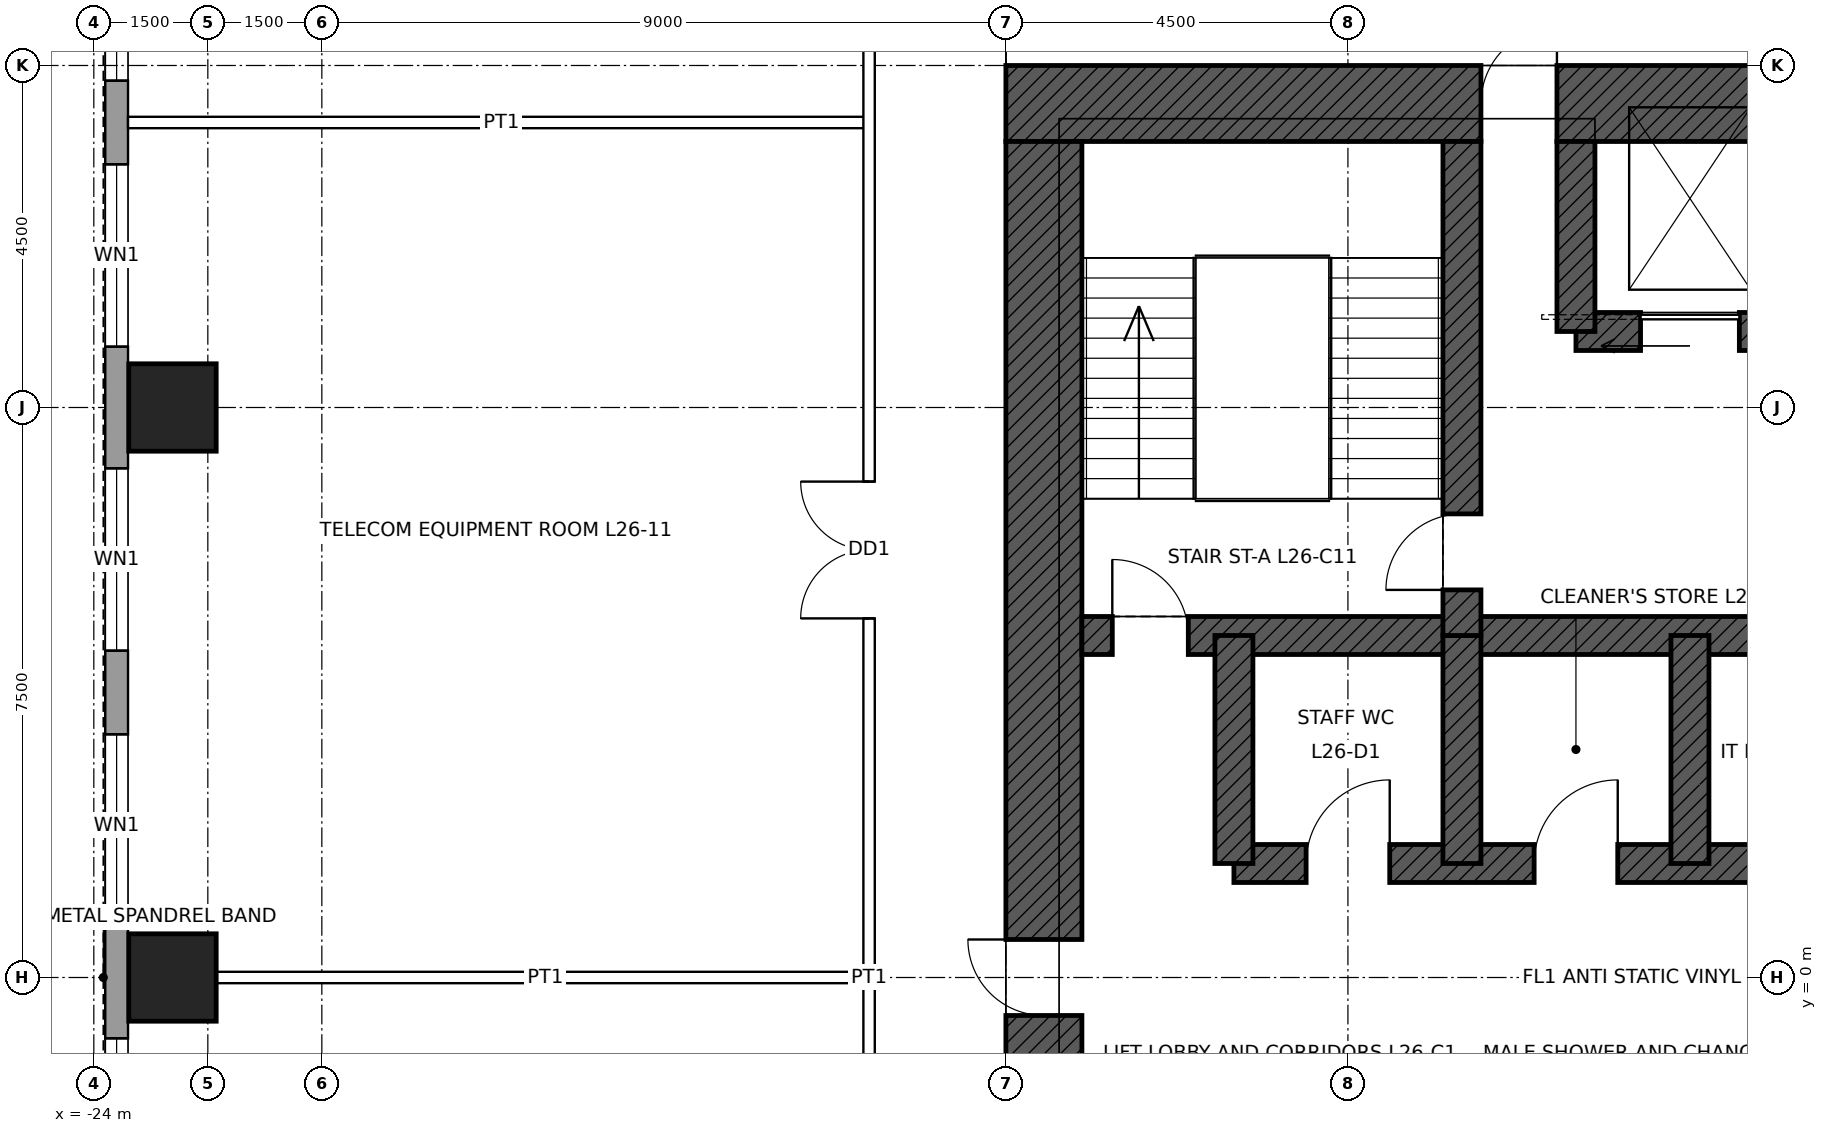
"""IFC4 building model, lengths in metres.
Left out: names, types, materials, properties, quantities, classifications, styles, units other than length and angle.
Written with IfcOpenShell. Run it as: python <this file> out.ifc"""

import sys

from ifc_helpers import new_model, si_unit, direction, frame, frame_2d, origin, origin_2d, place, context, subcontext, project, spatial, rectangle, hollow_rectangle, extrude, element, fill, save


model = new_model("IFC4")
c1 = context("Model", 3, precision=1e-05, world=origin(), true_north=direction((0.0, 1.0)))
c2 = subcontext(c1, "Body", "Model", "MODEL_VIEW")
j1 = project(units=[si_unit("LENGTHUNIT", "METRE"), si_unit("PLANEANGLEUNIT", "RADIAN")], contexts=[c1])
p1 = place(None, origin())
s1 = spatial("IfcSite", under=j1, at=p1, CompositionType="ELEMENT")
p2 = place(p1, origin())
s2 = spatial("IfcBuilding", under=s1, at=p2, CompositionType="ELEMENT")
p3 = place(p2, frame((0.0, 0.0, 131.4)))
s3 = spatial("IfcBuildingStorey", under=s2, at=p3, CompositionType="ELEMENT", Elevation=131.4)
for number, where, z_axis, x_axis in (
    (1, (-22.965, 0.0, 0.0), (0.0, 0.0, 1.0), (1.0, 0.0, 0.0)),
    (2, (-22.965, 7.5, 0.0), (0.0, 0.0, 1.0), (1.0, 0.0, 0.0)),
):
    element("IfcColumn", number, at=place(p3, frame(where, z_axis=z_axis, x_axis=x_axis)), inside=s3, PredefinedType="COLUMN", context=c2, shape_type="SweptSolid", body=[
        extrude(hollow_rectangle(XDim=1.15, YDim=1.15, WallThickness=0.075, at=origin_2d()), origin(), (0.0, 0.0, 1.0), 4.5),
    ])
p4 = place(p3, frame((-12.0, 11.5, 0.0), z_axis=(0.0, 0.0, 1.0), x_axis=(1.0, 0.0, 0.0)))
e3 = element("IfcWall", 3, at=p4, inside=s3, PredefinedType="SHEAR", context=c2, shape_type="SweptSolid", body=[
    extrude(rectangle(XDim=24.0, YDim=1.0, at=frame_2d((12.0, 0.0))), origin(), (0.0, 0.0, 1.0), 4.5),
])
p5 = place(p4, frame((6.25, 0.0, 0.0)))
e4 = element("IfcOpeningElement", 4, at=p5, cuts=e3, PredefinedType="OPENING", context=c2, shape_type="SweptSolid", body=[
    extrude(rectangle(XDim=1.0, YDim=2.4, at=frame_2d((0.5, 1.2))), frame((0.0, 0.51, 0.0), z_axis=(0.0, -1.0, 0.0), x_axis=(1.0, 0.0, 0.0)), (0.0, 0.0, 1.0), 1.02),
])
p6 = place(p4, frame((16.75, 0.0, 0.0)))
e5 = element("IfcOpeningElement", 5, at=p6, cuts=e3, PredefinedType="OPENING", context=c2, shape_type="SweptSolid", body=[
    extrude(rectangle(XDim=1.0, YDim=2.4, at=frame_2d((0.5, 1.2))), frame((0.0, 0.51, 0.0), z_axis=(0.0, -1.0, 0.0), x_axis=(1.0, 0.0, 0.0)), (0.0, 0.0, 1.0), 1.02),
])
p7 = place(p3, frame((-11.5, -11.0, 0.0), z_axis=(0.0, 0.0, 1.0), x_axis=(0.0, 1.0, 0.0)))
e6 = element("IfcWall", 6, at=p7, inside=s3, PredefinedType="SHEAR", context=c2, shape_type="SweptSolid", body=[
    extrude(rectangle(XDim=22.0, YDim=1.0, at=frame_2d((11.0, 0.0))), origin(), (0.0, 0.0, 1.0), 4.5),
])
p8 = place(p7, frame((10.5, 0.0, 0.0)))
e7 = element("IfcOpeningElement", 7, at=p8, cuts=e6, PredefinedType="OPENING", context=c2, shape_type="SweptSolid", body=[
    extrude(rectangle(XDim=1.0, YDim=2.4, at=frame_2d((0.5, 1.2))), frame((0.0, 0.51, 0.0), z_axis=(0.0, -1.0, 0.0), x_axis=(1.0, 0.0, 0.0)), (0.0, 0.0, 1.0), 1.02),
])
p9 = place(p3, frame((-11.0, 4.5, 0.0), z_axis=(0.0, 0.0, 1.0), x_axis=(1.0, 0.0, 0.0)))
e8 = element("IfcWall", 8, at=p9, inside=s3, PredefinedType="SHEAR", context=c2, shape_type="SweptSolid", body=[
    extrude(rectangle(XDim=22.0, YDim=0.5, at=frame_2d((11.0, 0.0))), origin(), (0.0, 0.0, 1.0), 4.5),
])
p10 = place(p9, frame((0.4, 0.0, 0.0)))
e9 = element("IfcOpeningElement", 9, at=p10, cuts=e8, PredefinedType="OPENING", context=c2, shape_type="SweptSolid", body=[
    extrude(rectangle(XDim=1.0, YDim=2.1, at=frame_2d((0.5, 1.05))), frame((0.0, 0.26, 0.0), z_axis=(0.0, -1.0, 0.0), x_axis=(1.0, 0.0, 0.0)), (0.0, 0.0, 1.0), 0.52),
])
p11 = place(p9, frame((20.6, 0.0, 0.0)))
e10 = element("IfcOpeningElement", 10, at=p11, cuts=e8, PredefinedType="OPENING", context=c2, shape_type="SweptSolid", body=[
    extrude(rectangle(XDim=1.0, YDim=2.1, at=frame_2d((0.5, 1.05))), frame((0.0, 0.26, 0.0), z_axis=(0.0, -1.0, 0.0), x_axis=(1.0, 0.0, 0.0)), (0.0, 0.0, 1.0), 0.52),
])
p12 = place(p3, frame((-9.0, 1.5, 0.0), z_axis=(0.0, 0.0, 1.0), x_axis=(1.0, 0.0, 0.0)))
e11 = element("IfcWall", 11, at=p12, inside=s3, PredefinedType="SHEAR", context=c2, shape_type="SweptSolid", body=[
    extrude(rectangle(XDim=18.0, YDim=0.5, at=frame_2d((9.0, 0.0))), origin(), (0.0, 0.0, 1.0), 4.5),
])
p13 = place(p12, frame((9.95, 0.0, 0.0)))
e12 = element("IfcOpeningElement", 12, at=p13, cuts=e11, PredefinedType="OPENING", context=c2, shape_type="SweptSolid", body=[
    extrude(rectangle(XDim=1.1, YDim=2.1, at=frame_2d((0.55, 1.05))), frame((0.0, 0.26, 0.0), z_axis=(0.0, -1.0, 0.0), x_axis=(1.0, 0.0, 0.0)), (0.0, 0.0, 1.0), 0.52),
])
p14 = place(p12, frame((12.95, 0.0, 0.0)))
e13 = element("IfcOpeningElement", 13, at=p14, cuts=e11, PredefinedType="OPENING", context=c2, shape_type="SweptSolid", body=[
    extrude(rectangle(XDim=1.1, YDim=2.1, at=frame_2d((0.55, 1.05))), frame((0.0, 0.26, 0.0), z_axis=(0.0, -1.0, 0.0), x_axis=(1.0, 0.0, 0.0)), (0.0, 0.0, 1.0), 0.52),
])
p15 = place(p12, frame((15.95, 0.0, 0.0)))
e14 = element("IfcOpeningElement", 14, at=p15, cuts=e11, PredefinedType="OPENING", context=c2, shape_type="SweptSolid", body=[
    extrude(rectangle(XDim=1.1, YDim=2.1, at=frame_2d((0.55, 1.05))), frame((0.0, 0.26, 0.0), z_axis=(0.0, -1.0, 0.0), x_axis=(1.0, 0.0, 0.0)), (0.0, 0.0, 1.0), 0.52),
])
p16 = place(p12, frame((0.95, 0.0, 0.0)))
e15 = element("IfcOpeningElement", 15, at=p16, cuts=e11, PredefinedType="OPENING", context=c2, shape_type="SweptSolid", body=[
    extrude(rectangle(XDim=1.1, YDim=2.1, at=frame_2d((0.55, 1.05))), frame((0.0, 0.26, 0.0), z_axis=(0.0, -1.0, 0.0), x_axis=(1.0, 0.0, 0.0)), (0.0, 0.0, 1.0), 0.52),
])
p17 = place(p12, frame((3.95, 0.0, 0.0)))
e16 = element("IfcOpeningElement", 16, at=p17, cuts=e11, PredefinedType="OPENING", context=c2, shape_type="SweptSolid", body=[
    extrude(rectangle(XDim=1.1, YDim=2.1, at=frame_2d((0.55, 1.05))), frame((0.0, 0.26, 0.0), z_axis=(0.0, -1.0, 0.0), x_axis=(1.0, 0.0, 0.0)), (0.0, 0.0, 1.0), 0.52),
])
p18 = place(p12, frame((6.95, 0.0, 0.0)))
e17 = element("IfcOpeningElement", 17, at=p18, cuts=e11, PredefinedType="OPENING", context=c2, shape_type="SweptSolid", body=[
    extrude(rectangle(XDim=1.1, YDim=2.1, at=frame_2d((0.55, 1.05))), frame((0.0, 0.26, 0.0), z_axis=(0.0, -1.0, 0.0), x_axis=(1.0, 0.0, 0.0)), (0.0, 0.0, 1.0), 0.52),
])
p19 = place(p3, frame((-4.5, 8.5, 0.0), z_axis=(0.0, 0.0, 1.0), x_axis=(1.0, 0.0, 0.0)))
e18 = element("IfcWall", 18, at=p19, inside=s3, PredefinedType="SHEAR", context=c2, shape_type="SweptSolid", body=[
    extrude(rectangle(XDim=9.0, YDim=0.5, at=frame_2d((4.5, 0.0))), origin(), (0.0, 0.0, 1.0), 4.5),
])
p20 = place(p19, frame((0.85, 0.0, 0.0)))
e19 = element("IfcOpeningElement", 19, at=p20, cuts=e18, PredefinedType="OPENING", context=c2, shape_type="SweptSolid", body=[
    extrude(rectangle(XDim=1.3, YDim=2.4, at=frame_2d((0.65, 1.2))), frame((0.0, 0.26, 0.0), z_axis=(0.0, -1.0, 0.0), x_axis=(1.0, 0.0, 0.0)), (0.0, 0.0, 1.0), 0.52),
])
p21 = place(p19, frame((6.85, 0.0, 0.0)))
e20 = element("IfcOpeningElement", 20, at=p21, cuts=e18, PredefinedType="OPENING", context=c2, shape_type="SweptSolid", body=[
    extrude(rectangle(XDim=1.3, YDim=2.4, at=frame_2d((0.65, 1.2))), frame((0.0, 0.26, 0.0), z_axis=(0.0, -1.0, 0.0), x_axis=(1.0, 0.0, 0.0)), (0.0, 0.0, 1.0), 0.52),
])
p22 = place(p19, frame((3.85, 0.0, 0.0)))
e21 = element("IfcOpeningElement", 21, at=p22, cuts=e18, PredefinedType="OPENING", context=c2, shape_type="SweptSolid", body=[
    extrude(rectangle(XDim=1.3, YDim=2.4, at=frame_2d((0.65, 1.2))), frame((0.0, 0.26, 0.0), z_axis=(0.0, -1.0, 0.0), x_axis=(1.0, 0.0, 0.0)), (0.0, 0.0, 1.0), 0.52),
])
for number, where, z_axis, x_axis in (
    (22, (-9.0, 1.5, 0.0), (0.0, 0.0, 1.0), (0.0, 1.0, 0.0)),
    (23, (-6.0, 1.5, 0.0), (0.0, 0.0, 1.0), (0.0, 1.0, 0.0)),
    (24, (-3.0, 1.5, 0.0), (0.0, 0.0, 1.0), (0.0, 1.0, 0.0)),
):
    element("IfcWall", number, at=place(p3, frame(where, z_axis=z_axis, x_axis=x_axis)), inside=s3, PredefinedType="SHEAR", context=c2, shape_type="SweptSolid", body=[
        extrude(rectangle(XDim=3.0, YDim=0.5, at=frame_2d((1.5, 0.0))), origin(), (0.0, 0.0, 1.0), 4.5),
    ])
p23 = place(p3, frame((-6.0, 4.5, 0.0), z_axis=(0.0, 0.0, 1.0), x_axis=(0.0, 1.0, 0.0)))
e25 = element("IfcWall", 25, at=p23, inside=s3, PredefinedType="SHEAR", context=c2, shape_type="SweptSolid", body=[
    extrude(rectangle(XDim=6.5, YDim=0.5, at=frame_2d((3.25, 0.0))), origin(), (0.0, 0.0, 1.0), 4.5),
])
p24 = place(p23, frame((0.6, 0.0, 0.0)))
e26 = element("IfcOpeningElement", 26, at=p24, cuts=e25, PredefinedType="OPENING", context=c2, shape_type="SweptSolid", body=[
    extrude(rectangle(XDim=1.0, YDim=2.1, at=frame_2d((0.5, 1.05))), frame((0.0, 0.26, 0.0), z_axis=(0.0, -1.0, 0.0), x_axis=(1.0, 0.0, 0.0)), (0.0, 0.0, 1.0), 0.52),
])
p25 = place(p3, frame((-4.5, 8.5, 0.0), z_axis=(0.0, 0.0, 1.0), x_axis=(0.0, 1.0, 0.0)))
e27 = element("IfcWall", 27, at=p25, inside=s3, PredefinedType="SHEAR", context=c2, shape_type="SweptSolid", body=[
    extrude(rectangle(XDim=2.5, YDim=0.5, at=frame_2d((1.25, 0.0))), origin(), (0.0, 0.0, 1.0), 4.5),
])
p26 = place(p3, frame((-23.7, -16.2, 0.0), z_axis=(0.0, 0.0, 1.0), x_axis=(0.0, 1.0, 0.0)))
e28 = element("IfcWall", 28, at=p26, inside=s3, PredefinedType="SOLIDWALL", context=c2, shape_type="SweptSolid", body=[
    extrude(rectangle(XDim=32.4, YDim=0.3, at=frame_2d((16.2, 0.0))), origin(), (0.0, 0.0, 1.0), 4.3),
])
p27 = place(p26, frame((2.0, 0.0, 1.0)))
e29 = element("IfcOpeningElement", 29, at=p27, cuts=e28, PredefinedType="OPENING", context=c2, shape_type="SweptSolid", body=[
    extrude(rectangle(XDim=2.4, YDim=1.2, at=frame_2d((1.2, 0.6))), frame((0.0, 0.16, 0.0), z_axis=(0.0, -1.0, 0.0), x_axis=(1.0, 0.0, 0.0)), (0.0, 0.0, 1.0), 0.32),
])
p28 = place(p26, frame((5.5, 0.0, 1.0)))
e30 = element("IfcOpeningElement", 30, at=p28, cuts=e28, PredefinedType="OPENING", context=c2, shape_type="SweptSolid", body=[
    extrude(rectangle(XDim=2.4, YDim=1.2, at=frame_2d((1.2, 0.6))), frame((0.0, 0.16, 0.0), z_axis=(0.0, -1.0, 0.0), x_axis=(1.0, 0.0, 0.0)), (0.0, 0.0, 1.0), 0.32),
])
p29 = place(p26, frame((9.5, 0.0, 1.0)))
e31 = element("IfcOpeningElement", 31, at=p29, cuts=e28, PredefinedType="OPENING", context=c2, shape_type="SweptSolid", body=[
    extrude(rectangle(XDim=2.4, YDim=1.2, at=frame_2d((1.2, 0.6))), frame((0.0, 0.16, 0.0), z_axis=(0.0, -1.0, 0.0), x_axis=(1.0, 0.0, 0.0)), (0.0, 0.0, 1.0), 0.32),
])
p30 = place(p26, frame((13.0, 0.0, 1.0)))
e32 = element("IfcOpeningElement", 32, at=p30, cuts=e28, PredefinedType="OPENING", context=c2, shape_type="SweptSolid", body=[
    extrude(rectangle(XDim=2.4, YDim=1.2, at=frame_2d((1.2, 0.6))), frame((0.0, 0.16, 0.0), z_axis=(0.0, -1.0, 0.0), x_axis=(1.0, 0.0, 0.0)), (0.0, 0.0, 1.0), 0.32),
])
p31 = place(p26, frame((17.0, 0.0, 1.0)))
e33 = element("IfcOpeningElement", 33, at=p31, cuts=e28, PredefinedType="OPENING", context=c2, shape_type="SweptSolid", body=[
    extrude(rectangle(XDim=2.4, YDim=1.2, at=frame_2d((1.2, 0.6))), frame((0.0, 0.16, 0.0), z_axis=(0.0, -1.0, 0.0), x_axis=(1.0, 0.0, 0.0)), (0.0, 0.0, 1.0), 0.32),
])
p32 = place(p26, frame((20.5, 0.0, 1.0)))
e34 = element("IfcOpeningElement", 34, at=p32, cuts=e28, PredefinedType="OPENING", context=c2, shape_type="SweptSolid", body=[
    extrude(rectangle(XDim=2.4, YDim=1.2, at=frame_2d((1.2, 0.6))), frame((0.0, 0.16, 0.0), z_axis=(0.0, -1.0, 0.0), x_axis=(1.0, 0.0, 0.0)), (0.0, 0.0, 1.0), 0.32),
])
p33 = place(p26, frame((24.5, 0.0, 1.0)))
e35 = element("IfcOpeningElement", 35, at=p33, cuts=e28, PredefinedType="OPENING", context=c2, shape_type="SweptSolid", body=[
    extrude(rectangle(XDim=2.4, YDim=1.2, at=frame_2d((1.2, 0.6))), frame((0.0, 0.16, 0.0), z_axis=(0.0, -1.0, 0.0), x_axis=(1.0, 0.0, 0.0)), (0.0, 0.0, 1.0), 0.32),
])
p34 = place(p26, frame((28.0, 0.0, 1.0)))
e36 = element("IfcOpeningElement", 36, at=p34, cuts=e28, PredefinedType="OPENING", context=c2, shape_type="SweptSolid", body=[
    extrude(rectangle(XDim=2.4, YDim=1.2, at=frame_2d((1.2, 0.6))), frame((0.0, 0.16, 0.0), z_axis=(0.0, -1.0, 0.0), x_axis=(1.0, 0.0, 0.0)), (0.0, 0.0, 1.0), 0.32),
])
p35 = place(p3, frame((-22.39, 0.0, 0.0), z_axis=(0.0, 0.0, 1.0), x_axis=(1.0, 0.0, 0.0)))
e37 = element("IfcWall", 37, at=p35, inside=s3, PredefinedType="PARTITIONING", context=c2, shape_type="SweptSolid", body=[
    extrude(rectangle(XDim=8.665, YDim=0.15, at=frame_2d((4.333, 0.0))), origin(), (0.0, 0.0, 1.0), 3.431),
])
p36 = place(p3, frame((-23.55, 11.25, 0.0), z_axis=(0.0, 0.0, 1.0), x_axis=(1.0, 0.0, 0.0)))
e38 = element("IfcWall", 38, at=p36, inside=s3, PredefinedType="PARTITIONING", context=c2, shape_type="SweptSolid", body=[
    extrude(rectangle(XDim=9.825, YDim=0.15, at=frame_2d((4.913, 0.0))), origin(), (0.0, 0.0, 1.0), 3.431),
])
p37 = place(p3, frame((-13.8, -13.875, 0.0), z_axis=(0.0, 0.0, 1.0), x_axis=(0.0, 1.0, 0.0)))
e39 = element("IfcWall", 39, at=p37, inside=s3, PredefinedType="PARTITIONING", context=c2, shape_type="SweptSolid", body=[
    extrude(rectangle(XDim=27.75, YDim=0.15, at=frame_2d((13.875, 0.0))), origin(), (0.0, 0.0, 1.0), 4.3),
])
p38 = place(p37, frame((7.75, 0.0, 0.0)))
e40 = element("IfcOpeningElement", 40, at=p38, cuts=e39, PredefinedType="OPENING", context=c2, shape_type="SweptSolid", body=[
    extrude(rectangle(XDim=1.0, YDim=2.1, at=frame_2d((0.5, 1.05))), frame((0.0, 0.085, 0.0), z_axis=(0.0, -1.0, 0.0), x_axis=(1.0, 0.0, 0.0)), (0.0, 0.0, 1.0), 0.17),
])
p39 = place(p37, frame((18.6, 0.0, 0.0)))
e41 = element("IfcOpeningElement", 41, at=p39, cuts=e39, PredefinedType="OPENING", context=c2, shape_type="SweptSolid", body=[
    extrude(rectangle(XDim=1.8, YDim=2.4, at=frame_2d((0.9, 1.2))), frame((0.0, 0.085, 0.0), z_axis=(0.0, -1.0, 0.0), x_axis=(1.0, 0.0, 0.0)), (0.0, 0.0, 1.0), 0.17),
])
p40 = place(p30, origin())
e42 = element("IfcWindow", 42, at=p40, inside=s3, PartitioningType="SINGLE_PANEL", PredefinedType="WINDOW", context=c2, shape_type="SweptSolid", body=[
    extrude(rectangle(XDim=2.4, YDim=1.2, at=frame_2d((1.2, 0.6))), frame((0.0, 0.03, 0.0), z_axis=(0.0, -1.0, 0.0), x_axis=(1.0, 0.0, 0.0)), (0.0, 0.0, 1.0), 0.06),
])
fill(e32, e42)
p41 = place(p31, origin())
e43 = element("IfcWindow", 43, at=p41, inside=s3, PartitioningType="SINGLE_PANEL", PredefinedType="WINDOW", context=c2, shape_type="SweptSolid", body=[
    extrude(rectangle(XDim=2.4, YDim=1.2, at=frame_2d((1.2, 0.6))), frame((0.0, 0.03, 0.0), z_axis=(0.0, -1.0, 0.0), x_axis=(1.0, 0.0, 0.0)), (0.0, 0.0, 1.0), 0.06),
])
fill(e33, e43)
p42 = place(p32, origin())
e44 = element("IfcWindow", 44, at=p42, inside=s3, PartitioningType="SINGLE_PANEL", PredefinedType="WINDOW", context=c2, shape_type="SweptSolid", body=[
    extrude(rectangle(XDim=2.4, YDim=1.2, at=frame_2d((1.2, 0.6))), frame((0.0, 0.03, 0.0), z_axis=(0.0, -1.0, 0.0), x_axis=(1.0, 0.0, 0.0)), (0.0, 0.0, 1.0), 0.06),
])
fill(e34, e44)
p43 = place(p33, origin())
e45 = element("IfcWindow", 45, at=p43, inside=s3, PartitioningType="SINGLE_PANEL", PredefinedType="WINDOW", context=c2, shape_type="SweptSolid", body=[
    extrude(rectangle(XDim=2.4, YDim=1.2, at=frame_2d((1.2, 0.6))), frame((0.0, 0.03, 0.0), z_axis=(0.0, -1.0, 0.0), x_axis=(1.0, 0.0, 0.0)), (0.0, 0.0, 1.0), 0.06),
])
fill(e35, e45)
p44 = place(p34, origin())
e46 = element("IfcWindow", 46, at=p44, inside=s3, PartitioningType="SINGLE_PANEL", PredefinedType="WINDOW", context=c2, shape_type="SweptSolid", body=[
    extrude(rectangle(XDim=2.4, YDim=1.2, at=frame_2d((1.2, 0.6))), frame((0.0, 0.03, 0.0), z_axis=(0.0, -1.0, 0.0), x_axis=(1.0, 0.0, 0.0)), (0.0, 0.0, 1.0), 0.06),
])
fill(e36, e46)
p45 = place(p10, origin())
e47 = element("IfcDoor", 47, at=p45, inside=s3, OperationType="SINGLE_SWING_LEFT", PredefinedType="DOOR", context=c2, shape_type="SweptSolid", body=[
    extrude(rectangle(XDim=1.0, YDim=2.1, at=frame_2d((0.5, 1.05))), frame((0.0, 0.025, 0.0), z_axis=(0.0, -1.0, 0.0), x_axis=(1.0, 0.0, 0.0)), (0.0, 0.0, 1.0), 0.05),
])
fill(e9, e47)
p46 = place(p24, origin())
e48 = element("IfcDoor", 48, at=p46, inside=s3, OperationType="SINGLE_SWING_LEFT", PredefinedType="DOOR", context=c2, shape_type="SweptSolid", body=[
    extrude(rectangle(XDim=1.0, YDim=2.1, at=frame_2d((0.5, 1.05))), frame((0.0, 0.025, 0.0), z_axis=(0.0, -1.0, 0.0), x_axis=(1.0, 0.0, 0.0)), (0.0, 0.0, 1.0), 0.05),
])
fill(e26, e48)
p47 = place(p5, origin())
e49 = element("IfcDoor", 49, at=p47, inside=s3, OperationType="SINGLE_SWING_RIGHT", PredefinedType="DOOR", context=c2, shape_type="SweptSolid", body=[
    extrude(rectangle(XDim=1.0, YDim=2.4, at=frame_2d((0.5, 1.2))), frame((0.0, 0.485, 0.0), z_axis=(0.0, -1.0, 0.0), x_axis=(1.0, 0.0, 0.0)), (0.0, 0.0, 1.0), 0.05),
])
fill(e4, e49)
p48 = place(p8, origin())
e50 = element("IfcDoor", 50, at=p48, inside=s3, OperationType="SINGLE_SWING_RIGHT", PredefinedType="DOOR", context=c2, shape_type="SweptSolid", body=[
    extrude(rectangle(XDim=1.0, YDim=2.4, at=frame_2d((0.5, 1.2))), frame((0.0, 0.485, 0.0), z_axis=(0.0, -1.0, 0.0), x_axis=(1.0, 0.0, 0.0)), (0.0, 0.0, 1.0), 0.05),
])
fill(e7, e50)
p49 = place(p20, origin())
e51 = element("IfcDoor", 51, at=p49, inside=s3, OperationType="SLIDING_TO_LEFT", PredefinedType="DOOR", context=c2, shape_type="SweptSolid", body=[
    extrude(rectangle(XDim=1.3, YDim=2.4, at=frame_2d((0.65, 1.2))), frame((0.0, 0.025, 0.0), z_axis=(0.0, -1.0, 0.0), x_axis=(1.0, 0.0, 0.0)), (0.0, 0.0, 1.0), 0.05),
])
fill(e19, e51)
p50 = place(p16, origin())
e52 = element("IfcDoor", 52, at=p50, inside=s3, OperationType="SINGLE_SWING_RIGHT", PredefinedType="DOOR", context=c2, shape_type="SweptSolid", body=[
    extrude(rectangle(XDim=1.1, YDim=2.1, at=frame_2d((0.55, 1.05))), frame((0.0, 0.025, 0.0), z_axis=(0.0, -1.0, 0.0), x_axis=(1.0, 0.0, 0.0)), (0.0, 0.0, 1.0), 0.05),
])
fill(e15, e52)
p51 = place(p17, origin())
e53 = element("IfcDoor", 53, at=p51, inside=s3, OperationType="SINGLE_SWING_RIGHT", PredefinedType="DOOR", context=c2, shape_type="SweptSolid", body=[
    extrude(rectangle(XDim=1.1, YDim=2.1, at=frame_2d((0.55, 1.05))), frame((0.0, 0.025, 0.0), z_axis=(0.0, -1.0, 0.0), x_axis=(1.0, 0.0, 0.0)), (0.0, 0.0, 1.0), 0.05),
])
fill(e16, e53)
p52 = place(p39, origin())
e54 = element("IfcDoor", 54, at=p52, inside=s3, OperationType="DOUBLE_DOOR_SINGLE_SWING", PredefinedType="DOOR", context=c2, shape_type="SweptSolid", body=[
    extrude(rectangle(XDim=1.8, YDim=2.4, at=frame_2d((0.9, 1.2))), frame((0.0, 0.025, 0.0), z_axis=(0.0, -1.0, 0.0), x_axis=(1.0, 0.0, 0.0)), (0.0, 0.0, 1.0), 0.05),
])
fill(e41, e54)
save(model, sys.argv[1])
